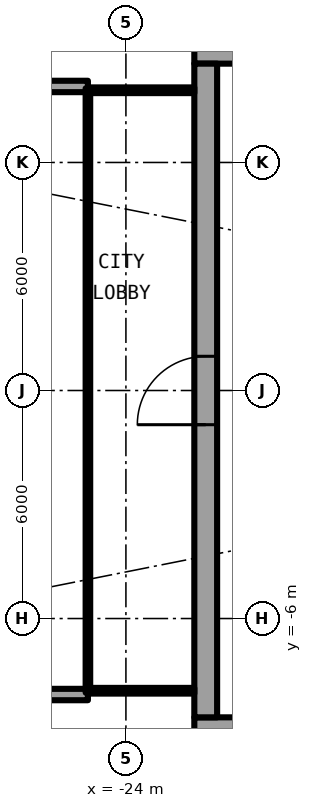
"""IFC4 building model, lengths in metres.
Left out: names, types, materials, properties, quantities, classifications, styles, units other than length and angle.
Written with IfcOpenShell. Run it as: python <this file> out.ifc"""

import sys

from ifc_helpers import new_model, si_unit, direction, frame, frame_2d, origin, place, context, subcontext, project, spatial, rectangle, extrude, element, fill, save


model = new_model("IFC4")
c1 = context("Model", 3, precision=1e-05, world=origin(), true_north=direction((0.0, 1.0)))
c2 = subcontext(c1, "Body", "Model", "MODEL_VIEW")
j1 = project(units=[si_unit("LENGTHUNIT", "METRE"), si_unit("PLANEANGLEUNIT", "RADIAN")], contexts=[c1])
p1 = place(None, origin())
s1 = spatial("IfcSite", under=j1, at=p1, CompositionType="ELEMENT")
p2 = place(p1, origin())
s2 = spatial("IfcBuilding", under=s1, at=p2, CompositionType="ELEMENT")
p3 = place(p2, frame((0.0, 0.0, 117.75)))
s3 = spatial("IfcBuildingStorey", under=s2, at=p3, CompositionType="ELEMENT", Elevation=117.75)
for number, where, z_axis, x_axis in (
    (1, (-25.0, 8.0, 0.0), (0.0, 0.0, 1.0), (-1.0, 0.0, 0.0)),
    (2, (-25.0, -8.0, 0.0), (0.0, 0.0, 1.0), (-1.0, 0.0, 0.0)),
):
    element("IfcWall", number, at=place(p3, frame(where, z_axis=z_axis, x_axis=x_axis)), inside=s3, PredefinedType="SOLIDWALL", context=c2, shape_type="SweptSolid", body=[
        extrude(rectangle(XDim=2.667, YDim=0.3, at=frame_2d((1.333, 0.0))), origin(), (0.0, 0.0, 1.0), 2.7),
    ])
p4 = place(p3, frame((-22.2, -8.9, 0.0), z_axis=(0.0, 0.0, 1.0), x_axis=(1.0, 0.0, 0.0)))
e3 = element("IfcWall", 3, at=p4, inside=s3, PredefinedType="SHEAR", context=c2, shape_type="SweptSolid", body=[
    extrude(rectangle(XDim=13.8, YDim=0.6, at=frame_2d((6.9, 0.0))), origin(), (0.0, 0.0, 1.0), 3.05),
])
p5 = place(p4, frame((1.125, 0.0, 0.0)))
e4 = element("IfcOpeningElement", 4, at=p5, cuts=e3, PredefinedType="OPENING", context=c2, shape_type="SweptSolid", body=[
    extrude(rectangle(XDim=1.2, YDim=2.3, at=frame_2d((0.6, 1.15))), frame((0.0, 0.31, 0.0), z_axis=(0.0, -1.0, 0.0), x_axis=(1.0, 0.0, 0.0)), (0.0, 0.0, 1.0), 0.62),
])
p6 = place(p3, frame((-8.4, 8.9, 0.0), z_axis=(0.0, 0.0, 1.0), x_axis=(-1.0, 0.0, 0.0)))
e5 = element("IfcWall", 5, at=p6, inside=s3, PredefinedType="SHEAR", context=c2, shape_type="SweptSolid", body=[
    extrude(rectangle(XDim=13.8, YDim=0.6, at=frame_2d((6.9, 0.0))), origin(), (0.0, 0.0, 1.0), 3.05),
])
p7 = place(p6, frame((11.475, 0.0, 0.0)))
e6 = element("IfcOpeningElement", 6, at=p7, cuts=e5, PredefinedType="OPENING", context=c2, shape_type="SweptSolid", body=[
    extrude(rectangle(XDim=1.2, YDim=2.3, at=frame_2d((0.6, 1.15))), frame((0.0, 0.31, 0.0), z_axis=(0.0, -1.0, 0.0), x_axis=(1.0, 0.0, 0.0)), (0.0, 0.0, 1.0), 0.62),
])
p8 = place(p3, frame((-21.9, -8.6, 0.0), z_axis=(0.0, 0.0, 1.0), x_axis=(0.0, 1.0, 0.0)))
e7 = element("IfcWall", 7, at=p8, inside=s3, PredefinedType="SHEAR", context=c2, shape_type="SweptSolid", body=[
    extrude(rectangle(XDim=17.2, YDim=0.6, at=frame_2d((8.6, 0.0))), origin(), (0.0, 0.0, 1.0), 3.05),
])
p9 = place(p8, frame((7.7, 0.0, 0.0)))
e8 = element("IfcOpeningElement", 8, at=p9, cuts=e7, PredefinedType="OPENING", context=c2, shape_type="SweptSolid", body=[
    extrude(rectangle(XDim=1.8, YDim=2.3, at=frame_2d((0.9, 1.15))), frame((0.0, 0.31, 0.0), z_axis=(0.0, -1.0, 0.0), x_axis=(1.0, 0.0, 0.0)), (0.0, 0.0, 1.0), 0.62),
])
for number, where, z_axis, x_axis in (
    (9, (-22.2, 7.9, 0.0), (0.0, 0.0, 1.0), (-1.0, 0.0, 0.0)),
    (10, (-22.2, -7.9, 0.0), (0.0, 0.0, 1.0), (-1.0, 0.0, 0.0)),
):
    element("IfcWall", number, at=place(p3, frame(where, z_axis=z_axis, x_axis=x_axis)), inside=s3, PredefinedType="PARTITIONING", context=c2, shape_type="SweptSolid", body=[
        extrude(rectangle(XDim=2.74, YDim=0.15, at=frame_2d((1.37, 0.0))), origin(), (0.0, 0.0, 1.0), 2.7),
    ])
p10 = place(p3, frame((-25.0, 7.95, 0.0), z_axis=(0.0, 0.0, 1.0), x_axis=(0.0, -1.0, 0.0)))
e11 = element("IfcWall", 11, at=p10, inside=s3, PredefinedType="PARTITIONING", context=c2, shape_type="SweptSolid", body=[
    extrude(rectangle(XDim=15.9, YDim=0.12, at=frame_2d((7.95, 0.0))), origin(), (0.0, 0.0, 1.0), 2.7),
])
p11 = place(p10, frame((0.95, 0.0, 0.1)))
e12 = element("IfcOpeningElement", 12, at=p11, cuts=e11, PredefinedType="OPENING", context=c2, shape_type="SweptSolid", body=[
    extrude(rectangle(XDim=14.0, YDim=2.35, at=frame_2d((7.0, 1.175))), frame((0.0, 0.07, 0.0), z_axis=(0.0, -1.0, 0.0), x_axis=(1.0, 0.0, 0.0)), (0.0, 0.0, 1.0), 0.14),
])
p12 = place(p9, origin())
e13 = element("IfcDoor", 13, at=p12, inside=s3, OperationType="SINGLE_SWING_LEFT", PredefinedType="DOOR", context=c2, shape_type="SweptSolid", body=[
    extrude(rectangle(XDim=1.8, YDim=2.3, at=frame_2d((0.9, 1.15))), frame((0.0, 0.025, 0.0), z_axis=(0.0, -1.0, 0.0), x_axis=(1.0, 0.0, 0.0)), (0.0, 0.0, 1.0), 0.05),
])
fill(e8, e13)
p13 = place(p11, origin())
e14 = element("IfcWindow", 14, at=p13, inside=s3, PartitioningType="SINGLE_PANEL", PredefinedType="WINDOW", context=c2, shape_type="SweptSolid", body=[
    extrude(rectangle(XDim=14.0, YDim=2.35, at=frame_2d((7.0, 1.175))), frame((0.0, 0.03, 0.0), z_axis=(0.0, -1.0, 0.0), x_axis=(1.0, 0.0, 0.0)), (0.0, 0.0, 1.0), 0.06),
])
fill(e12, e14)
save(model, sys.argv[1])
